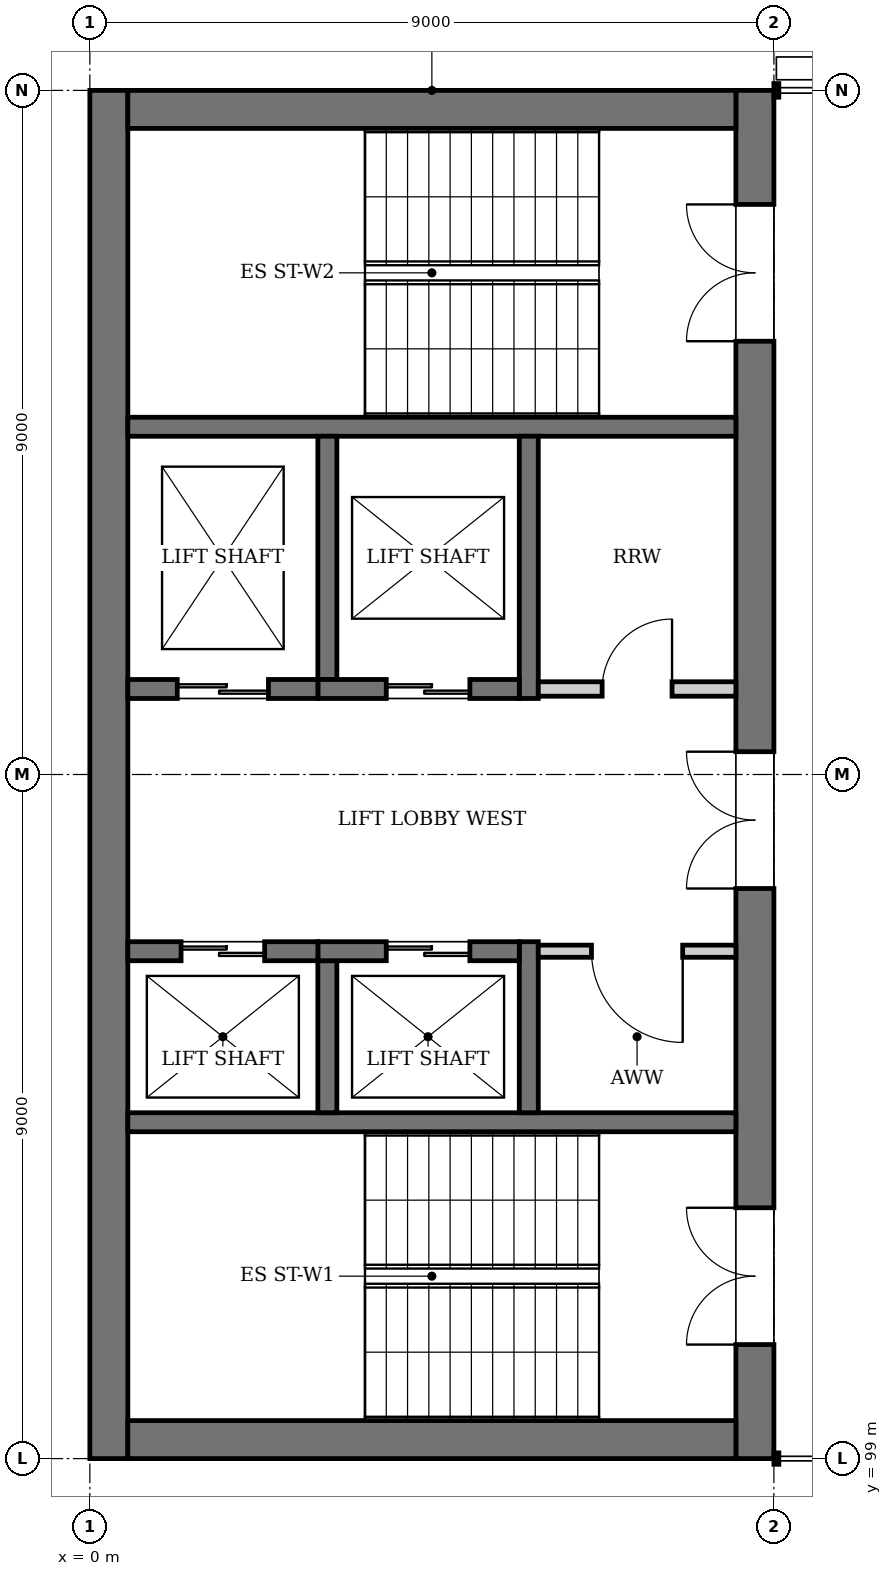
"""IFC4 building model, lengths in metres.
Left out: names, types, materials, properties, quantities, classifications, styles, units other than length and angle.
Written with IfcOpenShell. Run it as: python <this file> out.ifc"""

import sys

from ifc_helpers import new_model, si_unit, direction, frame, frame_2d, origin, place, context, subcontext, project, spatial, rectangle, extrude, element, fill, save


model = new_model("IFC4")
c1 = context("Model", 3, precision=1e-05, world=origin(), true_north=direction((0.0, 1.0)))
c2 = subcontext(c1, "Body", "Model", "MODEL_VIEW")
j1 = project(units=[si_unit("LENGTHUNIT", "METRE"), si_unit("PLANEANGLEUNIT", "RADIAN")], contexts=[c1])
p1 = place(None, origin())
s1 = spatial("IfcSite", under=j1, at=p1, CompositionType="ELEMENT")
p2 = place(p1, origin())
s2 = spatial("IfcBuilding", under=s1, at=p2, CompositionType="ELEMENT")
p3 = place(p2, frame((0.0, 0.0, 35.2)))
s3 = spatial("IfcBuildingStorey", under=s2, at=p3, CompositionType="ELEMENT", Elevation=35.2)
p4 = place(p3, frame((0.25, 99.0, 0.0), z_axis=(0.0, 0.0, 1.0), x_axis=(0.0, 1.0, 0.0)))
e1 = element("IfcWall", 1, at=p4, inside=s3, PredefinedType="SHEAR", context=c2, shape_type="SweptSolid", body=[
    extrude(rectangle(XDim=18.0, YDim=0.5, at=frame_2d((9.0, 0.0))), origin(), (0.0, 0.0, 1.0), 4.0),
])
p5 = place(p3, frame((8.75, 99.0, 0.0), z_axis=(0.0, 0.0, 1.0), x_axis=(0.0, 1.0, 0.0)))
e2 = element("IfcWall", 2, at=p5, inside=s3, PredefinedType="SHEAR", context=c2, shape_type="SweptSolid", body=[
    extrude(rectangle(XDim=18.0, YDim=0.5, at=frame_2d((9.0, 0.0))), origin(), (0.0, 0.0, 1.0), 4.0),
])
p6 = place(p5, frame((1.5, 0.0, 0.0)))
e3 = element("IfcOpeningElement", 3, at=p6, cuts=e2, PredefinedType="OPENING", context=c2, shape_type="SweptSolid", body=[
    extrude(rectangle(XDim=1.8, YDim=2.1, at=frame_2d((0.9, 1.05))), frame((0.0, 0.26, 0.0), z_axis=(0.0, -1.0, 0.0), x_axis=(1.0, 0.0, 0.0)), (0.0, 0.0, 1.0), 0.52),
])
p7 = place(p5, frame((14.7, 0.0, 0.0)))
e4 = element("IfcOpeningElement", 4, at=p7, cuts=e2, PredefinedType="OPENING", context=c2, shape_type="SweptSolid", body=[
    extrude(rectangle(XDim=1.8, YDim=2.1, at=frame_2d((0.9, 1.05))), frame((0.0, 0.26, 0.0), z_axis=(0.0, -1.0, 0.0), x_axis=(1.0, 0.0, 0.0)), (0.0, 0.0, 1.0), 0.52),
])
p8 = place(p5, frame((7.5, 0.0, 0.0)))
e5 = element("IfcOpeningElement", 5, at=p8, cuts=e2, PredefinedType="OPENING", context=c2, shape_type="SweptSolid", body=[
    extrude(rectangle(XDim=1.8, YDim=2.1, at=frame_2d((0.9, 1.05))), frame((0.0, 0.26, 0.0), z_axis=(0.0, -1.0, 0.0), x_axis=(1.0, 0.0, 0.0)), (0.0, 0.0, 1.0), 0.52),
])
for number, where, z_axis, x_axis in (
    (6, (0.5, 99.25, 0.0), (0.0, 0.0, 1.0), (1.0, 0.0, 0.0)),
    (7, (0.5, 116.75, 0.0), (0.0, 0.0, 1.0), (1.0, 0.0, 0.0)),
):
    element("IfcWall", number, at=place(p3, frame(where, z_axis=z_axis, x_axis=x_axis)), inside=s3, PredefinedType="SHEAR", context=c2, shape_type="SweptSolid", body=[
        extrude(rectangle(XDim=8.0, YDim=0.5, at=frame_2d((4.0, 0.0))), origin(), (0.0, 0.0, 1.0), 4.0),
    ])
for number, where, z_axis, x_axis in (
    (8, (8.5, 103.425, 0.0), (0.0, 0.0, 1.0), (-1.0, 0.0, 0.0)),
    (9, (8.5, 112.575, 0.0), (0.0, 0.0, 1.0), (-1.0, 0.0, 0.0)),
):
    element("IfcWall", number, at=place(p3, frame(where, z_axis=z_axis, x_axis=x_axis)), inside=s3, PredefinedType="SOLIDWALL", context=c2, shape_type="SweptSolid", body=[
        extrude(rectangle(XDim=8.0, YDim=0.25, at=frame_2d((4.0, 0.0))), origin(), (0.0, 0.0, 1.0), 3.75),
    ])
p9 = place(p3, frame((5.775, 103.55, 0.0), z_axis=(0.0, 0.0, 1.0), x_axis=(0.0, 1.0, 0.0)))
e10 = element("IfcWall", 10, at=p9, inside=s3, PredefinedType="SOLIDWALL", context=c2, shape_type="SweptSolid", body=[
    extrude(rectangle(XDim=2.25, YDim=0.25, at=frame_2d((1.125, 0.0))), origin(), (0.0, 0.0, 1.0), 4.0),
])
p10 = place(p3, frame((3.125, 103.55, 0.0), z_axis=(0.0, 0.0, 1.0), x_axis=(0.0, 1.0, 0.0)))
e11 = element("IfcWall", 11, at=p10, inside=s3, PredefinedType="SOLIDWALL", context=c2, shape_type="SweptSolid", body=[
    extrude(rectangle(XDim=2.0, YDim=0.25, at=frame_2d((1.0, 0.0))), origin(), (0.0, 0.0, 1.0), 4.0),
])
p11 = place(p3, frame((5.65, 105.675, 0.0), z_axis=(0.0, 0.0, 1.0), x_axis=(-1.0, 0.0, 0.0)))
e12 = element("IfcWall", 12, at=p11, inside=s3, PredefinedType="SOLIDWALL", context=c2, shape_type="SweptSolid", body=[
    extrude(rectangle(XDim=2.65, YDim=0.25, at=frame_2d((1.325, 0.0))), origin(), (0.0, 0.0, 1.0), 4.0),
])
p12 = place(p11, frame((0.65, 0.0, 0.0)))
e13 = element("IfcOpeningElement", 13, at=p12, cuts=e12, PredefinedType="OPENING", context=c2, shape_type="SweptSolid", body=[
    extrude(rectangle(XDim=1.1, YDim=2.1, at=frame_2d((0.55, 1.05))), frame((0.0, 0.135, 0.0), z_axis=(0.0, -1.0, 0.0), x_axis=(1.0, 0.0, 0.0)), (0.0, 0.0, 1.0), 0.27),
])
p13 = place(p3, frame((3.0, 105.675, 0.0), z_axis=(0.0, 0.0, 1.0), x_axis=(-1.0, 0.0, 0.0)))
e14 = element("IfcWall", 14, at=p13, inside=s3, PredefinedType="SOLIDWALL", context=c2, shape_type="SweptSolid", body=[
    extrude(rectangle(XDim=2.5, YDim=0.25, at=frame_2d((1.25, 0.0))), origin(), (0.0, 0.0, 1.0), 4.0),
])
p14 = place(p13, frame((0.7, 0.0, 0.0)))
e15 = element("IfcOpeningElement", 15, at=p14, cuts=e14, PredefinedType="OPENING", context=c2, shape_type="SweptSolid", body=[
    extrude(rectangle(XDim=1.1, YDim=2.1, at=frame_2d((0.55, 1.05))), frame((0.0, 0.135, 0.0), z_axis=(0.0, -1.0, 0.0), x_axis=(1.0, 0.0, 0.0)), (0.0, 0.0, 1.0), 0.27),
])
p15 = place(p3, frame((5.775, 109.0, 0.0), z_axis=(0.0, 0.0, 1.0), x_axis=(0.0, 1.0, 0.0)))
e16 = element("IfcWall", 16, at=p15, inside=s3, PredefinedType="SOLIDWALL", context=c2, shape_type="SweptSolid", body=[
    extrude(rectangle(XDim=3.45, YDim=0.25, at=frame_2d((1.725, 0.0))), origin(), (0.0, 0.0, 1.0), 4.0),
])
p16 = place(p3, frame((3.125, 109.25, 0.0), z_axis=(0.0, 0.0, 1.0), x_axis=(0.0, 1.0, 0.0)))
e17 = element("IfcWall", 17, at=p16, inside=s3, PredefinedType="SOLIDWALL", context=c2, shape_type="SweptSolid", body=[
    extrude(rectangle(XDim=3.2, YDim=0.25, at=frame_2d((1.6, 0.0))), origin(), (0.0, 0.0, 1.0), 4.0),
])
p17 = place(p3, frame((5.65, 109.125, 0.0), z_axis=(0.0, 0.0, 1.0), x_axis=(-1.0, 0.0, 0.0)))
e18 = element("IfcWall", 18, at=p17, inside=s3, PredefinedType="SOLIDWALL", context=c2, shape_type="SweptSolid", body=[
    extrude(rectangle(XDim=2.65, YDim=0.25, at=frame_2d((1.325, 0.0))), origin(), (0.0, 0.0, 1.0), 4.0),
])
p18 = place(p17, frame((0.65, 0.0, 0.0)))
e19 = element("IfcOpeningElement", 19, at=p18, cuts=e18, PredefinedType="OPENING", context=c2, shape_type="SweptSolid", body=[
    extrude(rectangle(XDim=1.1, YDim=2.1, at=frame_2d((0.55, 1.05))), frame((0.0, 0.135, 0.0), z_axis=(0.0, -1.0, 0.0), x_axis=(1.0, 0.0, 0.0)), (0.0, 0.0, 1.0), 0.27),
])
p19 = place(p3, frame((3.0, 109.125, 0.0), z_axis=(0.0, 0.0, 1.0), x_axis=(-1.0, 0.0, 0.0)))
e20 = element("IfcWall", 20, at=p19, inside=s3, PredefinedType="SOLIDWALL", context=c2, shape_type="SweptSolid", body=[
    extrude(rectangle(XDim=2.5, YDim=0.25, at=frame_2d((1.25, 0.0))), origin(), (0.0, 0.0, 1.0), 4.0),
])
p20 = place(p19, frame((0.65, 0.0, 0.0)))
e21 = element("IfcOpeningElement", 21, at=p20, cuts=e20, PredefinedType="OPENING", context=c2, shape_type="SweptSolid", body=[
    extrude(rectangle(XDim=1.2, YDim=2.1, at=frame_2d((0.6, 1.05))), frame((0.0, 0.135, 0.0), z_axis=(0.0, -1.0, 0.0), x_axis=(1.0, 0.0, 0.0)), (0.0, 0.0, 1.0), 0.27),
])
p21 = place(p3, frame((8.5, 105.675, 0.0), z_axis=(0.0, 0.0, 1.0), x_axis=(-1.0, 0.0, 0.0)))
e22 = element("IfcWall", 22, at=p21, inside=s3, PredefinedType="PARTITIONING", context=c2, shape_type="SweptSolid", body=[
    extrude(rectangle(XDim=2.6, YDim=0.16, at=frame_2d((1.3, 0.0))), origin(), (0.0, 0.0, 1.0), 3.75),
])
p22 = place(p21, frame((0.7, 0.0, 0.0)))
e23 = element("IfcOpeningElement", 23, at=p22, cuts=e22, PredefinedType="OPENING", context=c2, shape_type="SweptSolid", body=[
    extrude(rectangle(XDim=1.2, YDim=2.1, at=frame_2d((0.6, 1.05))), frame((0.0, 0.09, 0.0), z_axis=(0.0, -1.0, 0.0), x_axis=(1.0, 0.0, 0.0)), (0.0, 0.0, 1.0), 0.18),
])
p23 = place(p3, frame((8.5, 109.125, 0.0), z_axis=(0.0, 0.0, 1.0), x_axis=(-1.0, 0.0, 0.0)))
e24 = element("IfcWall", 24, at=p23, inside=s3, PredefinedType="PARTITIONING", context=c2, shape_type="SweptSolid", body=[
    extrude(rectangle(XDim=2.6, YDim=0.19, at=frame_2d((1.3, 0.0))), origin(), (0.0, 0.0, 1.0), 3.75),
])
p24 = place(p23, frame((0.84, 0.0, 0.0)))
e25 = element("IfcOpeningElement", 25, at=p24, cuts=e24, PredefinedType="OPENING", context=c2, shape_type="SweptSolid", body=[
    extrude(rectangle(XDim=0.92, YDim=2.1, at=frame_2d((0.46, 1.05))), frame((0.0, 0.105, 0.0), z_axis=(0.0, -1.0, 0.0), x_axis=(1.0, 0.0, 0.0)), (0.0, 0.0, 1.0), 0.21),
])
p25 = place(p12, origin())
e26 = element("IfcDoor", 26, at=p25, inside=s3, OperationType="DOUBLE_DOOR_SLIDING", PredefinedType="DOOR", context=c2, shape_type="SweptSolid", body=[
    extrude(rectangle(XDim=1.1, YDim=2.1, at=frame_2d((0.55, 1.05))), frame((0.0, 0.025, 0.0), z_axis=(0.0, -1.0, 0.0), x_axis=(1.0, 0.0, 0.0)), (0.0, 0.0, 1.0), 0.05),
])
fill(e13, e26)
p26 = place(p14, origin())
e27 = element("IfcDoor", 27, at=p26, inside=s3, OperationType="DOUBLE_DOOR_SLIDING", PredefinedType="DOOR", context=c2, shape_type="SweptSolid", body=[
    extrude(rectangle(XDim=1.1, YDim=2.1, at=frame_2d((0.55, 1.05))), frame((0.0, 0.025, 0.0), z_axis=(0.0, -1.0, 0.0), x_axis=(1.0, 0.0, 0.0)), (0.0, 0.0, 1.0), 0.05),
])
fill(e15, e27)
p27 = place(p18, origin())
e28 = element("IfcDoor", 28, at=p27, inside=s3, OperationType="DOUBLE_DOOR_SLIDING", PredefinedType="DOOR", context=c2, shape_type="SweptSolid", body=[
    extrude(rectangle(XDim=1.1, YDim=2.1, at=frame_2d((0.55, 1.05))), frame((0.0, 0.025, 0.0), z_axis=(0.0, -1.0, 0.0), x_axis=(1.0, 0.0, 0.0)), (0.0, 0.0, 1.0), 0.05),
])
fill(e19, e28)
p28 = place(p20, origin())
e29 = element("IfcDoor", 29, at=p28, inside=s3, OperationType="DOUBLE_DOOR_SLIDING", PredefinedType="DOOR", context=c2, shape_type="SweptSolid", body=[
    extrude(rectangle(XDim=1.2, YDim=2.1, at=frame_2d((0.6, 1.05))), frame((0.0, 0.025, 0.0), z_axis=(0.0, -1.0, 0.0), x_axis=(1.0, 0.0, 0.0)), (0.0, 0.0, 1.0), 0.05),
])
fill(e21, e29)
p29 = place(p6, origin())
e30 = element("IfcDoor", 30, at=p29, inside=s3, OperationType="DOUBLE_DOOR_SINGLE_SWING", PredefinedType="DOOR", context=c2, shape_type="SweptSolid", body=[
    extrude(rectangle(XDim=1.8, YDim=2.1, at=frame_2d((0.9, 1.05))), frame((0.0, 0.025, 0.0), z_axis=(0.0, -1.0, 0.0), x_axis=(1.0, 0.0, 0.0)), (0.0, 0.0, 1.0), 0.05),
])
fill(e3, e30)
p30 = place(p7, origin())
e31 = element("IfcDoor", 31, at=p30, inside=s3, OperationType="DOUBLE_DOOR_SINGLE_SWING", PredefinedType="DOOR", context=c2, shape_type="SweptSolid", body=[
    extrude(rectangle(XDim=1.8, YDim=2.1, at=frame_2d((0.9, 1.05))), frame((0.0, 0.025, 0.0), z_axis=(0.0, -1.0, 0.0), x_axis=(1.0, 0.0, 0.0)), (0.0, 0.0, 1.0), 0.05),
])
fill(e4, e31)
p31 = place(p8, origin())
e32 = element("IfcDoor", 32, at=p31, inside=s3, OperationType="DOUBLE_DOOR_SINGLE_SWING", PredefinedType="DOOR", context=c2, shape_type="SweptSolid", body=[
    extrude(rectangle(XDim=1.8, YDim=2.1, at=frame_2d((0.9, 1.05))), frame((0.0, 0.025, 0.0), z_axis=(0.0, -1.0, 0.0), x_axis=(1.0, 0.0, 0.0)), (0.0, 0.0, 1.0), 0.05),
])
fill(e5, e32)
p32 = place(p22, origin())
e33 = element("IfcDoor", 33, at=p32, inside=s3, OperationType="SINGLE_SWING_LEFT", PredefinedType="DOOR", context=c2, shape_type="SweptSolid", body=[
    extrude(rectangle(XDim=1.2, YDim=2.1, at=frame_2d((0.6, 1.05))), frame((0.0, 0.025, 0.0), z_axis=(0.0, -1.0, 0.0), x_axis=(1.0, 0.0, 0.0)), (0.0, 0.0, 1.0), 0.05),
])
fill(e23, e33)
p33 = place(p24, frame((0.92, 0.0, 0.0), z_axis=(0.0, 0.0, 1.0), x_axis=(-1.0, 0.0, 0.0)))
e34 = element("IfcDoor", 34, at=p33, inside=s3, OperationType="SINGLE_SWING_RIGHT", PredefinedType="DOOR", context=c2, shape_type="SweptSolid", body=[
    extrude(rectangle(XDim=0.92, YDim=2.1, at=frame_2d((0.46, 1.05))), frame((0.0, 0.025, 0.0), z_axis=(0.0, -1.0, 0.0), x_axis=(1.0, 0.0, 0.0)), (0.0, 0.0, 1.0), 0.05),
])
fill(e25, e34)
save(model, sys.argv[1])
